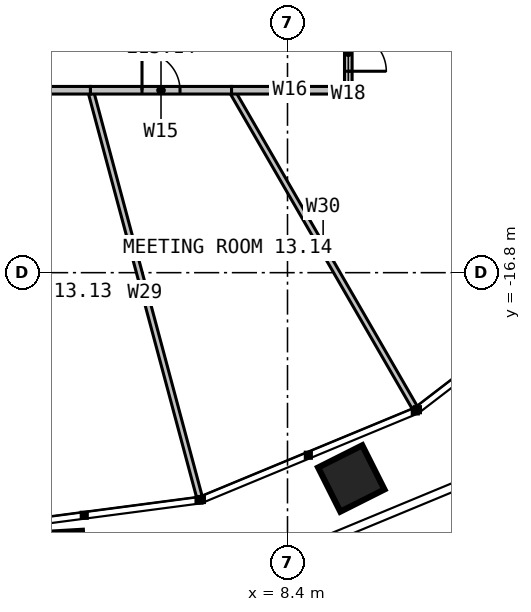
"""IFC4 building model, lengths in metres.
Left out: names, types, materials, properties, quantities, classifications, styles, units other than length and angle.
Written with IfcOpenShell. Run it as: python <this file> out.ifc"""

import sys

from ifc_helpers import new_model, si_unit, direction, frame, frame_2d, origin, place, context, subcontext, project, spatial, rectangle, extrude, element, fill, save


model = new_model("IFC4")
c1 = context("Model", 3, precision=1e-05, world=origin(), true_north=direction((0.0, 1.0)))
c2 = subcontext(c1, "Body", "Model", "MODEL_VIEW")
j1 = project(units=[si_unit("LENGTHUNIT", "METRE"), si_unit("PLANEANGLEUNIT", "RADIAN")], contexts=[c1])
p1 = place(None, origin())
s1 = spatial("IfcSite", under=j1, at=p1, CompositionType="ELEMENT")
p2 = place(p1, origin())
s2 = spatial("IfcBuilding", under=s1, at=p2, CompositionType="ELEMENT")
p3 = place(p2, frame((0.0, 0.0, 57.0)))
s3 = spatial("IfcBuildingStorey", under=s2, at=p3, CompositionType="ELEMENT", Elevation=57.0)
p4 = place(p3, frame((3.215, -12.0, 0.0), z_axis=(0.0, 0.0, 1.0), x_axis=(0.258830514209, -0.965922753078, 0.0)))
e1 = element("IfcWall", 1, at=p4, inside=s3, PredefinedType="PARTITIONING", context=c2, shape_type="SweptSolid", body=[
    extrude(rectangle(XDim=11.071, YDim=0.15, at=frame_2d((5.535, 0.0))), origin(), (0.0, 0.0, 1.0), 2.79),
])
p5 = place(p3, frame((6.928, -12.0, 0.0), z_axis=(0.0, 0.0, 1.0), x_axis=(0.499991431567, -0.866030350715, 0.0)))
e2 = element("IfcWall", 2, at=p5, inside=s3, PredefinedType="PARTITIONING", context=c2, shape_type="SweptSolid", body=[
    extrude(rectangle(XDim=9.638, YDim=0.15, at=frame_2d((4.819, 0.0))), origin(), (0.0, 0.0, 1.0), 2.79),
])
p6 = place(p3, frame((-1.58, -12.0, 0.0), z_axis=(0.0, 0.0, 1.0), x_axis=(1.0, 0.0, 0.0)))
e3 = element("IfcWall", 3, at=p6, inside=s3, PredefinedType="PARTITIONING", context=c2, shape_type="SweptSolid", body=[
    extrude(rectangle(XDim=4.795, YDim=0.2, at=frame_2d((2.397, 0.0))), origin(), (0.0, 0.0, 1.0), 3.8),
])
p7 = place(p6, frame((1.498, 0.0, 0.0)))
e4 = element("IfcOpeningElement", 4, at=p7, cuts=e3, PredefinedType="OPENING", context=c2, shape_type="SweptSolid", body=[
    extrude(rectangle(XDim=1.8, YDim=2.2, at=frame_2d((0.9, 1.1))), frame((0.0, 0.11, 0.0), z_axis=(0.0, -1.0, 0.0), x_axis=(1.0, 0.0, 0.0)), (0.0, 0.0, 1.0), 0.22),
])
p8 = place(p3, frame((3.215, -12.0, 0.0), z_axis=(0.0, 0.0, 1.0), x_axis=(1.0, 0.0, 0.0)))
e5 = element("IfcWall", 5, at=p8, inside=s3, PredefinedType="PARTITIONING", context=c2, shape_type="SweptSolid", body=[
    extrude(rectangle(XDim=3.713, YDim=0.2, at=frame_2d((1.856, 0.0))), origin(), (0.0, 0.0, 1.0), 3.8),
])
p9 = place(p8, frame((1.356, 0.0, 0.0)))
e6 = element("IfcOpeningElement", 6, at=p9, cuts=e5, PredefinedType="OPENING", context=c2, shape_type="SweptSolid", body=[
    extrude(rectangle(XDim=1.0, YDim=2.2, at=frame_2d((0.5, 1.1))), frame((0.0, 0.11, 0.0), z_axis=(0.0, -1.0, 0.0), x_axis=(1.0, 0.0, 0.0)), (0.0, 0.0, 1.0), 0.22),
])
p10 = place(p3, frame((6.928, -12.0, 0.0), z_axis=(0.0, 0.0, 1.0), x_axis=(1.0, 0.0, 0.0)))
e7 = element("IfcWall", 7, at=p10, inside=s3, PredefinedType="PARTITIONING", context=c2, shape_type="SweptSolid", body=[
    extrude(rectangle(XDim=3.072, YDim=0.2, at=frame_2d((1.536, 0.0))), origin(), (0.0, 0.0, 1.0), 3.8),
])
p11 = place(p3, frame((10.0, -10.0, 0.0), z_axis=(0.0, 0.0, 1.0), x_axis=(0.0, -1.0, 0.0)))
e8 = element("IfcWall", 8, at=p11, inside=s3, PredefinedType="PARTITIONING", context=c2, shape_type="SweptSolid", body=[
    extrude(rectangle(XDim=2.0, YDim=0.2, at=frame_2d((1.0, 0.0))), origin(), (0.0, 0.0, 1.0), 3.8),
])
p12 = place(p11, frame((0.5, 0.0, 0.0)))
e9 = element("IfcOpeningElement", 9, at=p12, cuts=e8, PredefinedType="OPENING", context=c2, shape_type="SweptSolid", body=[
    extrude(rectangle(XDim=1.0, YDim=2.2, at=frame_2d((0.5, 1.1))), frame((0.0, 0.11, 0.0), z_axis=(0.0, -1.0, 0.0), x_axis=(1.0, 0.0, 0.0)), (0.0, 0.0, 1.0), 0.22),
])
p13 = place(p9, origin())
e10 = element("IfcDoor", 10, at=p13, inside=s3, OperationType="SINGLE_SWING_LEFT", PredefinedType="DOOR", context=c2, shape_type="SweptSolid", body=[
    extrude(rectangle(XDim=1.0, YDim=2.2, at=frame_2d((0.5, 1.1))), frame((0.0, 0.025, 0.0), z_axis=(0.0, -1.0, 0.0), x_axis=(1.0, 0.0, 0.0)), (0.0, 0.0, 1.0), 0.05),
])
fill(e6, e10)
p14 = place(p12, origin())
e11 = element("IfcDoor", 11, at=p14, inside=s3, OperationType="SINGLE_SWING_RIGHT", PredefinedType="DOOR", context=c2, shape_type="SweptSolid", body=[
    extrude(rectangle(XDim=1.0, YDim=2.2, at=frame_2d((0.5, 1.1))), frame((0.0, 0.025, 0.0), z_axis=(0.0, -1.0, 0.0), x_axis=(1.0, 0.0, 0.0)), (0.0, 0.0, 1.0), 0.05),
])
fill(e9, e11)
save(model, sys.argv[1])
